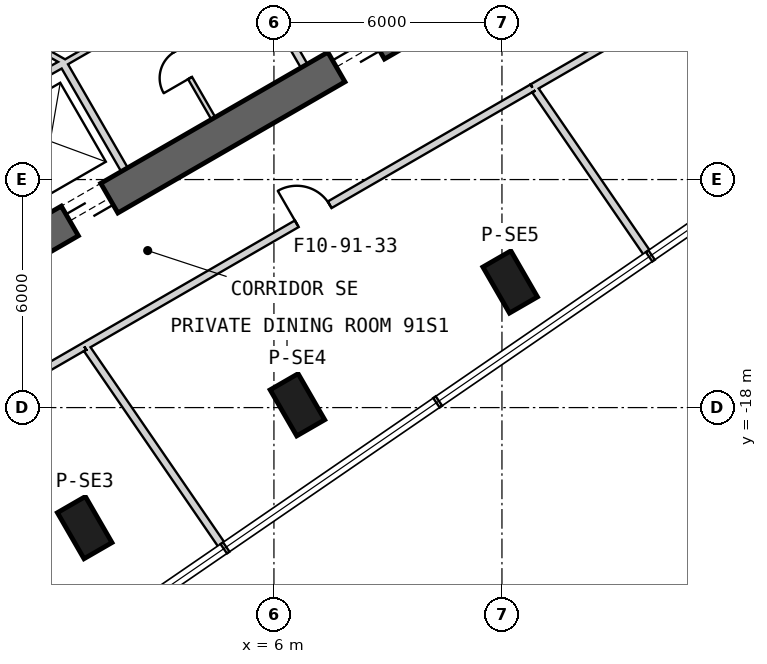
"""IFC4 building model, lengths in metres.
Left out: names, types, materials, properties, quantities, classifications, styles, units other than length and angle.
Written with IfcOpenShell. Run it as: python <this file> out.ifc"""

import sys

from ifc_helpers import new_model, si_unit, direction, frame, frame_2d, origin, origin_2d, place, context, subcontext, project, spatial, rectangle, extrude, element, fill, save


model = new_model("IFC4")
c1 = context("Model", 3, precision=1e-05, world=origin(), true_north=direction((0.0, 1.0)))
c2 = subcontext(c1, "Body", "Model", "MODEL_VIEW")
j1 = project(units=[si_unit("LENGTHUNIT", "METRE"), si_unit("PLANEANGLEUNIT", "RADIAN")], contexts=[c1])
p1 = place(None, origin())
s1 = spatial("IfcSite", under=j1, at=p1, CompositionType="ELEMENT")
p2 = place(p1, origin())
s2 = spatial("IfcBuilding", under=s1, at=p2, CompositionType="ELEMENT")
p3 = place(p2, frame((0.0, 0.0, 398.3)))
s3 = spatial("IfcBuildingStorey", under=s2, at=p3, CompositionType="ELEMENT", Elevation=398.3)
for number, where, z_axis, x_axis in (
    (1, (1.02, -21.159, -0.3), (0.0, 0.0, 1.0), (0.5, -0.866, 0.0)),
    (2, (6.618, -17.927, -0.3), (0.0, 0.0, 1.0), (0.5, -0.866, 0.0)),
    (3, (12.216, -14.695, -0.3), (0.0, 0.0, 1.0), (0.5, -0.866, 0.0)),
):
    element("IfcColumn", number, at=place(p3, frame(where, z_axis=z_axis, x_axis=x_axis)), inside=s3, PredefinedType="COLUMN", context=c2, shape_type="SweptSolid", body=[
        extrude(rectangle(XDim=1.4, YDim=0.85, at=origin_2d()), origin(), (0.0, 0.0, 1.0), 6.8),
    ])
p4 = place(p3, frame((-7.825, -17.97, 0.0), z_axis=(0.0, 0.0, 1.0), x_axis=(0.866028369851, 0.499994862586, 0.0)))
e4 = element("IfcWall", 4, at=p4, inside=s3, PredefinedType="SHEAR", context=c2, shape_type="SweptSolid", body=[
    extrude(rectangle(XDim=31.523, YDim=0.9, at=frame_2d((15.762, 0.0))), origin(), (0.0, 0.0, 1.0), 6.5),
])
p5 = place(p4, frame((7.062, 0.0, 0.0)))
e5 = element("IfcOpeningElement", 5, at=p5, cuts=e4, PredefinedType="OPENING", context=c2, shape_type="SweptSolid", body=[
    extrude(rectangle(XDim=1.2, YDim=2.4, at=frame_2d((0.6, 1.2))), frame((0.0, 0.46, 0.0), z_axis=(0.0, -1.0, 0.0), x_axis=(1.0, 0.0, 0.0)), (0.0, 0.0, 1.0), 0.92),
])
p6 = place(p4, frame((9.762, 0.0, 0.0)))
e6 = element("IfcOpeningElement", 6, at=p6, cuts=e4, PredefinedType="OPENING", context=c2, shape_type="SweptSolid", body=[
    extrude(rectangle(XDim=1.2, YDim=2.4, at=frame_2d((0.6, 1.2))), frame((0.0, 0.46, 0.0), z_axis=(0.0, -1.0, 0.0), x_axis=(1.0, 0.0, 0.0)), (0.0, 0.0, 1.0), 0.92),
])
p7 = place(p4, frame((17.862, 0.0, 0.0)))
e7 = element("IfcOpeningElement", 7, at=p7, cuts=e4, PredefinedType="OPENING", context=c2, shape_type="SweptSolid", body=[
    extrude(rectangle(XDim=1.2, YDim=2.4, at=frame_2d((0.6, 1.2))), frame((0.0, 0.46, 0.0), z_axis=(0.0, -1.0, 0.0), x_axis=(1.0, 0.0, 0.0)), (0.0, 0.0, 1.0), 0.92),
])
p8 = place(p4, frame((20.562, 0.0, 0.0)))
e8 = element("IfcOpeningElement", 8, at=p8, cuts=e4, PredefinedType="OPENING", context=c2, shape_type="SweptSolid", body=[
    extrude(rectangle(XDim=1.2, YDim=2.4, at=frame_2d((0.6, 1.2))), frame((0.0, 0.46, 0.0), z_axis=(0.0, -1.0, 0.0), x_axis=(1.0, 0.0, 0.0)), (0.0, 0.0, 1.0), 0.92),
])
p9 = place(p4, frame((26.712, 0.0, 0.0)))
e9 = element("IfcOpeningElement", 9, at=p9, cuts=e4, PredefinedType="OPENING", context=c2, shape_type="SweptSolid", body=[
    extrude(rectangle(XDim=1.2, YDim=2.4, at=frame_2d((0.6, 1.2))), frame((0.0, 0.46, 0.0), z_axis=(0.0, -1.0, 0.0), x_axis=(1.0, 0.0, 0.0)), (0.0, 0.0, 1.0), 0.92),
])
p10 = place(p4, frame((3.612, 0.0, 0.0)))
e10 = element("IfcOpeningElement", 10, at=p10, cuts=e4, PredefinedType="OPENING", context=c2, shape_type="SweptSolid", body=[
    extrude(rectangle(XDim=1.2, YDim=2.4, at=frame_2d((0.6, 1.2))), frame((0.0, 0.46, 0.0), z_axis=(0.0, -1.0, 0.0), x_axis=(1.0, 0.0, 0.0)), (0.0, 0.0, 1.0), 0.92),
])
p11 = place(p3, frame((0.442, -8.925, 0.0), z_axis=(0.0, 0.0, 1.0), x_axis=(0.499984717929, -0.866034226713, 0.0)))
e11 = element("IfcWall", 11, at=p11, inside=s3, PredefinedType="PLUMBINGWALL", context=c2, shape_type="SweptSolid", body=[
    extrude(rectangle(XDim=3.25, YDim=0.2, at=frame_2d((1.625, 0.0))), origin(), (0.0, 0.0, 1.0), 6.2),
])
p12 = place(p3, frame((-1.13, -9.832, 0.0), z_axis=(0.0, 0.0, 1.0), x_axis=(0.871988740738, 0.489525929882, 0.0)))
e12 = element("IfcWall", 12, at=p12, inside=s3, PredefinedType="PLUMBINGWALL", context=c2, shape_type="SweptSolid", body=[
    extrude(rectangle(XDim=1.845, YDim=0.2, at=frame_2d((0.922, 0.0))), origin(), (0.0, 0.0, 1.0), 6.2),
])
p13 = place(p3, frame((6.795, -9.01, 0.0), z_axis=(0.0, 0.0, 1.0), x_axis=(-0.499984717929, 0.866034226713, 0.0)))
e13 = element("IfcWall", 13, at=p13, inside=s3, PredefinedType="PLUMBINGWALL", context=c2, shape_type="SweptSolid", body=[
    extrude(rectangle(XDim=3.25, YDim=0.2, at=frame_2d((1.625, 0.0))), origin(), (0.0, 0.0, 1.0), 6.2),
])
p14 = place(p3, frame((4.405, -10.389, 0.0), z_axis=(0.0, 0.0, 1.0), x_axis=(-0.500017246033, 0.866015446554, 0.0)))
e14 = element("IfcWall", 14, at=p14, inside=s3, PredefinedType="PARTITIONING", context=c2, shape_type="SweptSolid", body=[
    extrude(rectangle(XDim=3.25, YDim=0.12, at=frame_2d((1.625, 0.0))), origin(), (0.0, 0.0, 1.0), 6.2),
])
p15 = place(p14, frame((1.225, 0.0, 0.0)))
e15 = element("IfcOpeningElement", 15, at=p15, cuts=e14, PredefinedType="OPENING", context=c2, shape_type="SweptSolid", body=[
    extrude(rectangle(XDim=0.8, YDim=2.1, at=frame_2d((0.4, 1.05))), frame((0.0, 0.07, 0.0), z_axis=(0.0, -1.0, 0.0), x_axis=(1.0, 0.0, 0.0)), (0.0, 0.0, 1.0), 0.14),
])
p16 = place(p3, frame((0.483, -8.936, 0.0), z_axis=(0.0, 0.0, 1.0), x_axis=(0.866028230842, 0.499995103361, 0.0)))
e16 = element("IfcWall", 16, at=p16, inside=s3, PredefinedType="PLUMBINGWALL", context=c2, shape_type="SweptSolid", body=[
    extrude(rectangle(XDim=5.4, YDim=0.15, at=frame_2d((2.7, 0.0))), origin(), (0.0, 0.0, 1.0), 6.2),
])
p17 = place(p16, frame((0.95, 0.0, 0.0)))
e17 = element("IfcOpeningElement", 17, at=p17, cuts=e16, PredefinedType="OPENING", context=c2, shape_type="SweptSolid", body=[
    extrude(rectangle(XDim=0.8, YDim=2.1, at=frame_2d((0.4, 1.05))), frame((0.0, 0.085, 0.0), z_axis=(0.0, -1.0, 0.0), x_axis=(1.0, 0.0, 0.0)), (0.0, 0.0, 1.0), 0.17),
])
p18 = place(p3, frame((-1.477, -7.808, 0.0), z_axis=(0.0, 0.0, 1.0), x_axis=(0.871822901869, -0.48982122022, 0.0)))
e18 = element("IfcWall", 18, at=p18, inside=s3, PredefinedType="PLUMBINGWALL", context=c2, shape_type="SweptSolid", body=[
    extrude(rectangle(XDim=2.24, YDim=0.15, at=frame_2d((1.12, 0.0))), origin(), (0.0, 0.0, 1.0), 6.2),
])
p19 = place(p18, frame((0.757, 0.0, 0.0)))
e19 = element("IfcOpeningElement", 19, at=p19, cuts=e18, PredefinedType="OPENING", context=c2, shape_type="SweptSolid", body=[
    extrude(rectangle(XDim=0.8, YDim=2.1, at=frame_2d((0.4, 1.05))), frame((0.0, 0.085, 0.0), z_axis=(0.0, -1.0, 0.0), x_axis=(1.0, 0.0, 0.0)), (0.0, 0.0, 1.0), 0.17),
])
p20 = place(p3, frame((-6.852, -20.93, 0.0), z_axis=(0.0, 0.0, 1.0), x_axis=(0.866016739626, 0.500015006463, 0.0)))
e20 = element("IfcWall", 20, at=p20, inside=s3, PredefinedType="PARTITIONING", context=c2, shape_type="SweptSolid", body=[
    extrude(rectangle(XDim=9.078, YDim=0.2, at=frame_2d((4.539, 0.0))), origin(), (0.0, 0.0, 1.0), 5.57),
])
p21 = place(p20, frame((4.1, 0.0, 0.0)))
e21 = element("IfcOpeningElement", 21, at=p21, cuts=e20, PredefinedType="OPENING", context=c2, shape_type="SweptSolid", body=[
    extrude(rectangle(XDim=1.0, YDim=2.1, at=frame_2d((0.5, 1.05))), frame((0.0, 0.11, 0.0), z_axis=(0.0, -1.0, 0.0), x_axis=(1.0, 0.0, 0.0)), (0.0, 0.0, 1.0), 0.22),
])
p22 = place(p3, frame((1.009, -16.391, 0.0), z_axis=(0.0, 0.0, 1.0), x_axis=(0.866026744585, 0.499997677658, 0.0)))
e22 = element("IfcWall", 22, at=p22, inside=s3, PredefinedType="PARTITIONING", context=c2, shape_type="SweptSolid", body=[
    extrude(rectangle(XDim=13.617, YDim=0.2, at=frame_2d((6.808, 0.0))), origin(), (0.0, 0.0, 1.0), 5.67),
])
p23 = place(p22, frame((6.456, 0.0, 0.0)))
e23 = element("IfcOpeningElement", 23, at=p23, cuts=e22, PredefinedType="OPENING", context=c2, shape_type="SweptSolid", body=[
    extrude(rectangle(XDim=1.0, YDim=2.1, at=frame_2d((0.5, 1.05))), frame((0.0, 0.11, 0.0), z_axis=(0.0, -1.0, 0.0), x_axis=(1.0, 0.0, 0.0)), (0.0, 0.0, 1.0), 0.22),
])
p24 = place(p3, frame((12.802, -9.583, 0.0), z_axis=(0.0, 0.0, 1.0), x_axis=(0.866025905529, 0.499999130952, 0.0)))
e24 = element("IfcWall", 24, at=p24, inside=s3, PredefinedType="PARTITIONING", context=c2, shape_type="SweptSolid", body=[
    extrude(rectangle(XDim=9.904, YDim=0.2, at=frame_2d((4.952, 0.0))), origin(), (0.0, 0.0, 1.0), 5.57),
])
p25 = place(p24, frame((4.456, 0.0, 0.0)))
e25 = element("IfcOpeningElement", 25, at=p25, cuts=e24, PredefinedType="OPENING", context=c2, shape_type="SweptSolid", body=[
    extrude(rectangle(XDim=1.0, YDim=2.1, at=frame_2d((0.5, 1.05))), frame((0.0, 0.11, 0.0), z_axis=(0.0, -1.0, 0.0), x_axis=(1.0, 0.0, 0.0)), (0.0, 0.0, 1.0), 0.22),
])
p26 = place(p3, frame((4.688, -21.709, 0.0), z_axis=(0.0, 0.0, 1.0), x_axis=(-0.565893636681, 0.824478254391, 0.0)))
e26 = element("IfcWall", 26, at=p26, inside=s3, PredefinedType="PARTITIONING", context=c2, shape_type="SweptSolid", body=[
    extrude(rectangle(XDim=6.364, YDim=0.2, at=frame_2d((3.182, 0.0))), origin(), (0.0, 0.0, 1.0), 6.2),
])
p27 = place(p3, frame((12.879, -9.654, 0.0), z_axis=(0.0, 0.0, 1.0), x_axis=(0.565899563161, -0.824474186627, 0.0)))
e27 = element("IfcWall", 27, at=p27, inside=s3, PredefinedType="PARTITIONING", context=c2, shape_type="SweptSolid", body=[
    extrude(rectangle(XDim=5.303, YDim=0.2, at=frame_2d((2.652, 0.0))), origin(), (0.0, 0.0, 1.0), 6.2),
])
p28 = place(p15, origin())
e28 = element("IfcDoor", 28, at=p28, inside=s3, OperationType="SINGLE_SWING_LEFT", PredefinedType="USERDEFINED", context=c2, shape_type="SweptSolid", body=[
    extrude(rectangle(XDim=0.8, YDim=2.1, at=frame_2d((0.4, 1.05))), frame((0.0, 0.025, 0.0), z_axis=(0.0, -1.0, 0.0), x_axis=(1.0, 0.0, 0.0)), (0.0, 0.0, 1.0), 0.05),
])
fill(e15, e28)
p29 = place(p23, origin())
e29 = element("IfcDoor", 29, at=p29, inside=s3, OperationType="SINGLE_SWING_LEFT", PredefinedType="USERDEFINED", context=c2, shape_type="SweptSolid", body=[
    extrude(rectangle(XDim=1.0, YDim=2.1, at=frame_2d((0.5, 1.05))), frame((0.0, 0.025, 0.0), z_axis=(0.0, -1.0, 0.0), x_axis=(1.0, 0.0, 0.0)), (0.0, 0.0, 1.0), 0.05),
])
fill(e23, e29)
p30 = place(p6, origin())
e30 = element("IfcDoor", 30, at=p30, inside=s3, OperationType="SLIDING_TO_LEFT", PredefinedType="USERDEFINED", context=c2, shape_type="SweptSolid", body=[
    extrude(rectangle(XDim=1.2, YDim=2.4, at=frame_2d((0.6, 1.2))), frame((0.0, 0.025, 0.0), z_axis=(0.0, -1.0, 0.0), x_axis=(1.0, 0.0, 0.0)), (0.0, 0.0, 1.0), 0.05),
])
fill(e6, e30)
p31 = place(p7, origin())
e31 = element("IfcDoor", 31, at=p31, inside=s3, OperationType="SLIDING_TO_LEFT", PredefinedType="USERDEFINED", context=c2, shape_type="SweptSolid", body=[
    extrude(rectangle(XDim=1.2, YDim=2.4, at=frame_2d((0.6, 1.2))), frame((0.0, 0.025, 0.0), z_axis=(0.0, -1.0, 0.0), x_axis=(1.0, 0.0, 0.0)), (0.0, 0.0, 1.0), 0.05),
])
fill(e7, e31)
save(model, sys.argv[1])
